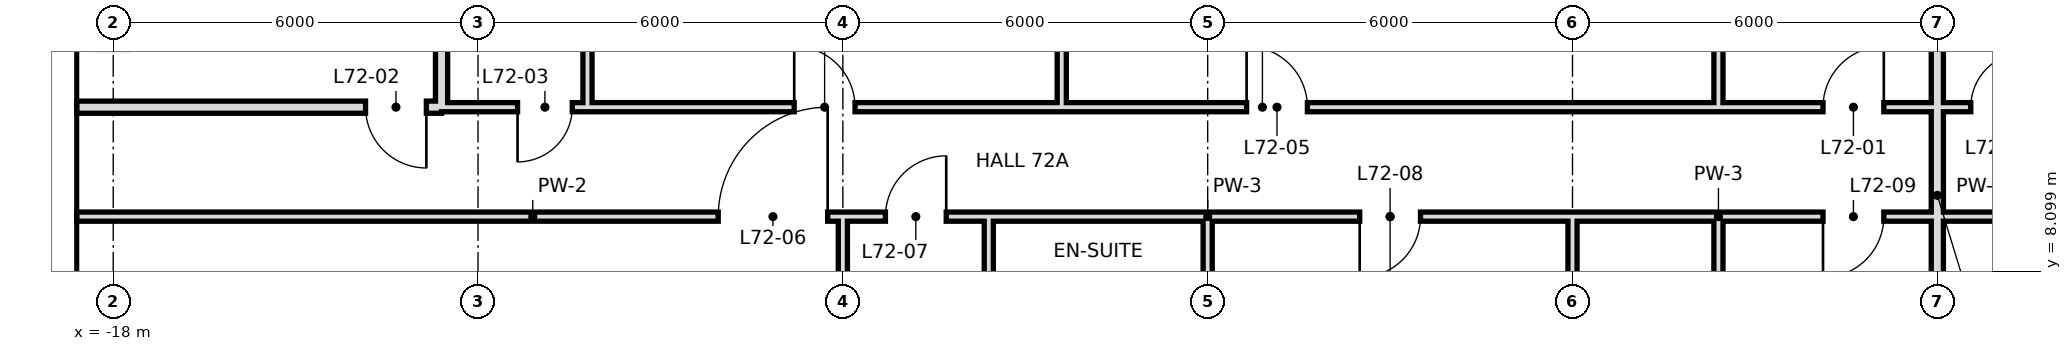
"""IFC4 building model, lengths in metres.
Left out: names, types, materials, properties, quantities, classifications, styles, units other than length and angle.
Written with IfcOpenShell. Run it as: python <this file> out.ifc"""

import sys

from ifc_helpers import new_model, si_unit, direction, frame, frame_2d, origin, place, context, subcontext, project, spatial, rectangle, extrude, element, fill, save


model = new_model("IFC4")
c1 = context("Model", 3, precision=1e-05, world=origin(), true_north=direction((0.0, 1.0)))
c2 = subcontext(c1, "Body", "Model", "MODEL_VIEW")
j1 = project(units=[si_unit("LENGTHUNIT", "METRE"), si_unit("PLANEANGLEUNIT", "RADIAN")], contexts=[c1])
p1 = place(None, origin())
s1 = spatial("IfcSite", under=j1, at=p1, CompositionType="ELEMENT")
p2 = place(p1, origin())
s2 = spatial("IfcBuilding", under=s1, at=p2, CompositionType="ELEMENT")
p3 = place(p2, frame((0.0, 0.0, 305.2)))
s3 = spatial("IfcBuildingStorey", under=s2, at=p3, CompositionType="ELEMENT", Elevation=305.2)
p4 = place(p3, frame((-10.2, 10.8, 0.0), z_axis=(0.0, 0.0, 1.0), x_axis=(0.0, 1.0, 0.0)))
e1 = element("IfcWall", 1, at=p4, inside=s3, PredefinedType="PARTITIONING", context=c2, shape_type="SweptSolid", body=[
    extrude(rectangle(XDim=7.2, YDim=0.15, at=frame_2d((3.6, 0.0))), origin(), (0.0, 0.0, 1.0), 3.42),
])
p5 = place(p3, frame((-12.6, 10.8, 0.0), z_axis=(0.0, 0.0, 1.0), x_axis=(0.0, 1.0, 0.0)))
e2 = element("IfcWall", 2, at=p5, inside=s3, PredefinedType="SOLIDWALL", context=c2, shape_type="SweptSolid", body=[
    extrude(rectangle(XDim=7.2, YDim=0.2, at=frame_2d((3.6, 0.0))), origin(), (0.0, 0.0, 1.0), 2.97),
])
p6 = place(p3, frame((-2.4, 10.8, 0.0), z_axis=(0.0, 0.0, 1.0), x_axis=(0.0, 1.0, 0.0)))
e3 = element("IfcWall", 3, at=p6, inside=s3, PredefinedType="PARTITIONING", context=c2, shape_type="SweptSolid", body=[
    extrude(rectangle(XDim=7.2, YDim=0.15, at=frame_2d((3.6, 0.0))), origin(), (0.0, 0.0, 1.0), 3.42),
])
p7 = place(p3, frame((-3.6, 6.0, 0.0), z_axis=(0.0, 0.0, 1.0), x_axis=(0.0, 1.0, 0.0)))
e4 = element("IfcWall", 4, at=p7, inside=s3, PredefinedType="PARTITIONING", context=c2, shape_type="SweptSolid", body=[
    extrude(rectangle(XDim=3.0, YDim=0.15, at=frame_2d((1.5, 0.0))), origin(), (0.0, 0.0, 1.0), 3.42),
])
p8 = place(p3, frame((-6.0, -0.6, 0.0), z_axis=(0.0, 0.0, 1.0), x_axis=(0.0, 1.0, 0.0)))
e5 = element("IfcWall", 5, at=p8, inside=s3, PredefinedType="PARTITIONING", context=c2, shape_type="SweptSolid", body=[
    extrude(rectangle(XDim=9.6, YDim=0.15, at=frame_2d((4.8, 0.0))), origin(), (0.0, 0.0, 1.0), 3.42),
])
p9 = place(p3, frame((0.0, 6.0, 0.0), z_axis=(0.0, 0.0, 1.0), x_axis=(0.0, 1.0, 0.0)))
e6 = element("IfcWall", 6, at=p9, inside=s3, PredefinedType="PARTITIONING", context=c2, shape_type="SweptSolid", body=[
    extrude(rectangle(XDim=3.0, YDim=0.15, at=frame_2d((1.5, 0.0))), origin(), (0.0, 0.0, 1.0), 2.72),
])
p10 = place(p3, frame((12.0, 0.0, 0.0), z_axis=(0.0, 0.0, 1.0), x_axis=(0.0, 1.0, 0.0)))
e7 = element("IfcWall", 7, at=p10, inside=s3, PredefinedType="SOLIDWALL", context=c2, shape_type="SweptSolid", body=[
    extrude(rectangle(XDim=18.7, YDim=0.2, at=frame_2d((9.35, 0.0))), origin(), (0.0, 0.0, 1.0), 2.72),
])
p11 = place(p3, frame((6.0, 6.0, 0.0), z_axis=(0.0, 0.0, 1.0), x_axis=(0.0, 1.0, 0.0)))
e8 = element("IfcWall", 8, at=p11, inside=s3, PredefinedType="PARTITIONING", context=c2, shape_type="SweptSolid", body=[
    extrude(rectangle(XDim=3.0, YDim=0.15, at=frame_2d((1.5, 0.0))), origin(), (0.0, 0.0, 1.0), 2.72),
])
p12 = place(p3, frame((8.4, 10.8, 0.0), z_axis=(0.0, 0.0, 1.0), x_axis=(0.0, 1.0, 0.0)))
e9 = element("IfcWall", 9, at=p12, inside=s3, PredefinedType="PARTITIONING", context=c2, shape_type="SweptSolid", body=[
    extrude(rectangle(XDim=7.9, YDim=0.15, at=frame_2d((3.95, 0.0))), origin(), (0.0, 0.0, 1.0), 3.42),
])
p13 = place(p3, frame((8.4, 6.0, 0.0), z_axis=(0.0, 0.0, 1.0), x_axis=(0.0, 1.0, 0.0)))
e10 = element("IfcWall", 10, at=p13, inside=s3, PredefinedType="PARTITIONING", context=c2, shape_type="SweptSolid", body=[
    extrude(rectangle(XDim=3.0, YDim=0.15, at=frame_2d((1.5, 0.0))), origin(), (0.0, 0.0, 1.0), 3.42),
])
p14 = place(p3, frame((-18.6, 10.8, 0.0), z_axis=(0.0, 0.0, 1.0), x_axis=(1.0, 0.0, 0.0)))
e11 = element("IfcWall", 11, at=p14, inside=s3, PredefinedType="SOLIDWALL", context=c2, shape_type="SweptSolid", body=[
    extrude(rectangle(XDim=6.0, YDim=0.2, at=frame_2d((3.0, 0.0))), origin(), (0.0, 0.0, 1.0), 2.97),
])
p15 = place(p14, frame((4.75, 0.0, 0.0)))
e12 = element("IfcOpeningElement", 12, at=p15, cuts=e11, PredefinedType="OPENING", context=c2, shape_type="SweptSolid", body=[
    extrude(rectangle(XDim=1.0, YDim=2.4, at=frame_2d((0.5, 1.2))), frame((0.0, 0.11, 0.0), z_axis=(0.0, -1.0, 0.0), x_axis=(1.0, 0.0, 0.0)), (0.0, 0.0, 1.0), 0.22),
])
p16 = place(p3, frame((-10.2, 10.8, 0.0), z_axis=(0.0, 0.0, 1.0), x_axis=(1.0, 0.0, 0.0)))
e13 = element("IfcWall", 13, at=p16, inside=s3, PredefinedType="PARTITIONING", context=c2, shape_type="SweptSolid", body=[
    extrude(rectangle(XDim=22.2, YDim=0.15, at=frame_2d((11.1, 0.0))), origin(), (0.0, 0.0, 1.0), 3.42),
])
p17 = place(p16, frame((20.32, 0.0, 0.0)))
e14 = element("IfcOpeningElement", 14, at=p17, cuts=e13, PredefinedType="OPENING", context=c2, shape_type="SweptSolid", body=[
    extrude(rectangle(XDim=1.0, YDim=2.4, at=frame_2d((0.5, 1.2))), frame((0.0, 0.085, 0.0), z_axis=(0.0, -1.0, 0.0), x_axis=(1.0, 0.0, 0.0)), (0.0, 0.0, 1.0), 0.17),
])
p18 = place(p16, frame((3.4, 0.0, 0.0)))
e15 = element("IfcOpeningElement", 15, at=p18, cuts=e13, PredefinedType="OPENING", context=c2, shape_type="SweptSolid", body=[
    extrude(rectangle(XDim=1.0, YDim=2.4, at=frame_2d((0.5, 1.2))), frame((0.0, 0.085, 0.0), z_axis=(0.0, -1.0, 0.0), x_axis=(1.0, 0.0, 0.0)), (0.0, 0.0, 1.0), 0.17),
])
p19 = place(p16, frame((10.84, 0.0, 0.0)))
e16 = element("IfcOpeningElement", 16, at=p19, cuts=e13, PredefinedType="OPENING", context=c2, shape_type="SweptSolid", body=[
    extrude(rectangle(XDim=1.0, YDim=2.4, at=frame_2d((0.5, 1.2))), frame((0.0, 0.085, 0.0), z_axis=(0.0, -1.0, 0.0), x_axis=(1.0, 0.0, 0.0)), (0.0, 0.0, 1.0), 0.17),
])
p20 = place(p3, frame((-12.6, 10.8, 0.0), z_axis=(0.0, 0.0, 1.0), x_axis=(1.0, 0.0, 0.0)))
e17 = element("IfcWall", 17, at=p20, inside=s3, PredefinedType="PARTITIONING", context=c2, shape_type="SweptSolid", body=[
    extrude(rectangle(XDim=2.4, YDim=0.15, at=frame_2d((1.2, 0.0))), origin(), (0.0, 0.0, 1.0), 3.42),
])
p21 = place(p20, frame((1.25, 0.0, 0.0)))
e18 = element("IfcOpeningElement", 18, at=p21, cuts=e17, PredefinedType="OPENING", context=c2, shape_type="SweptSolid", body=[
    extrude(rectangle(XDim=0.9, YDim=2.4, at=frame_2d((0.45, 1.2))), frame((0.0, 0.085, 0.0), z_axis=(0.0, -1.0, 0.0), x_axis=(1.0, 0.0, 0.0)), (0.0, 0.0, 1.0), 0.17),
])
p22 = place(p3, frame((12.0, 10.8, 0.0), z_axis=(0.0, 0.0, 1.0), x_axis=(1.0, 0.0, 0.0)))
e19 = element("IfcWall", 19, at=p22, inside=s3, PredefinedType="PARTITIONING", context=c2, shape_type="SweptSolid", body=[
    extrude(rectangle(XDim=2.4, YDim=0.15, at=frame_2d((1.2, 0.0))), origin(), (0.0, 0.0, 1.0), 3.42),
])
p23 = place(p22, frame((0.55, 0.0, 0.0)))
e20 = element("IfcOpeningElement", 20, at=p23, cuts=e19, PredefinedType="OPENING", context=c2, shape_type="SweptSolid", body=[
    extrude(rectangle(XDim=0.9, YDim=2.4, at=frame_2d((0.45, 1.2))), frame((0.0, 0.085, 0.0), z_axis=(0.0, -1.0, 0.0), x_axis=(1.0, 0.0, 0.0)), (0.0, 0.0, 1.0), 0.17),
])
p24 = place(p3, frame((-18.6, 9.0, 0.0), z_axis=(0.0, 0.0, 1.0), x_axis=(1.0, 0.0, 0.0)))
e21 = element("IfcWall", 21, at=p24, inside=s3, PredefinedType="PARTITIONING", context=c2, shape_type="SweptSolid", body=[
    extrude(rectangle(XDim=15.0, YDim=0.15, at=frame_2d((7.5, 0.0))), origin(), (0.0, 0.0, 1.0), 3.42),
])
p25 = place(p24, frame((10.55, 0.0, 0.0)))
e22 = element("IfcOpeningElement", 22, at=p25, cuts=e21, PredefinedType="OPENING", context=c2, shape_type="SweptSolid", body=[
    extrude(rectangle(XDim=1.8, YDim=2.4, at=frame_2d((0.9, 1.2))), frame((0.0, 0.085, 0.0), z_axis=(0.0, -1.0, 0.0), x_axis=(1.0, 0.0, 0.0)), (0.0, 0.0, 1.0), 0.17),
])
p26 = place(p24, frame((13.3, 0.0, 0.0)))
e23 = element("IfcOpeningElement", 23, at=p26, cuts=e21, PredefinedType="OPENING", context=c2, shape_type="SweptSolid", body=[
    extrude(rectangle(XDim=1.0, YDim=2.4, at=frame_2d((0.5, 1.2))), frame((0.0, 0.085, 0.0), z_axis=(0.0, -1.0, 0.0), x_axis=(1.0, 0.0, 0.0)), (0.0, 0.0, 1.0), 0.17),
])
p27 = place(p3, frame((0.0, 9.0, 0.0), z_axis=(0.0, 0.0, 1.0), x_axis=(1.0, 0.0, 0.0)))
e24 = element("IfcWall", 24, at=p27, inside=s3, PredefinedType="PARTITIONING", context=c2, shape_type="SweptSolid", body=[
    extrude(rectangle(XDim=6.0, YDim=0.15, at=frame_2d((3.0, 0.0))), origin(), (0.0, 0.0, 1.0), 3.42),
])
p28 = place(p27, frame((2.5, 0.0, 0.0)))
e25 = element("IfcOpeningElement", 25, at=p28, cuts=e24, PredefinedType="OPENING", context=c2, shape_type="SweptSolid", body=[
    extrude(rectangle(XDim=1.0, YDim=2.4, at=frame_2d((0.5, 1.2))), frame((0.0, 0.085, 0.0), z_axis=(0.0, -1.0, 0.0), x_axis=(1.0, 0.0, 0.0)), (0.0, 0.0, 1.0), 0.17),
])
p29 = place(p3, frame((8.4, 9.0, 0.0), z_axis=(0.0, 0.0, 1.0), x_axis=(1.0, 0.0, 0.0)))
e26 = element("IfcWall", 26, at=p29, inside=s3, PredefinedType="PARTITIONING", context=c2, shape_type="SweptSolid", body=[
    extrude(rectangle(XDim=9.6, YDim=0.15, at=frame_2d((4.8, 0.0))), origin(), (0.0, 0.0, 1.0), 3.42),
])
p30 = place(p29, frame((1.72, 0.0, 0.0)))
e27 = element("IfcOpeningElement", 27, at=p30, cuts=e26, PredefinedType="OPENING", context=c2, shape_type="SweptSolid", body=[
    extrude(rectangle(XDim=1.0, YDim=2.4, at=frame_2d((0.5, 1.2))), frame((0.0, 0.085, 0.0), z_axis=(0.0, -1.0, 0.0), x_axis=(1.0, 0.0, 0.0)), (0.0, 0.0, 1.0), 0.17),
])
p31 = place(p29, frame((5.2, 0.0, 0.0)))
e28 = element("IfcOpeningElement", 28, at=p31, cuts=e26, PredefinedType="OPENING", context=c2, shape_type="SweptSolid", body=[
    extrude(rectangle(XDim=1.0, YDim=2.4, at=frame_2d((0.5, 1.2))), frame((0.0, 0.085, 0.0), z_axis=(0.0, -1.0, 0.0), x_axis=(1.0, 0.0, 0.0)), (0.0, 0.0, 1.0), 0.17),
])
p32 = place(p3, frame((-3.6, 9.0, 0.0), z_axis=(0.0, 0.0, 1.0), x_axis=(1.0, 0.0, 0.0)))
e29 = element("IfcWall", 29, at=p32, inside=s3, PredefinedType="PARTITIONING", context=c2, shape_type="SweptSolid", body=[
    extrude(rectangle(XDim=3.6, YDim=0.15, at=frame_2d((1.8, 0.0))), origin(), (0.0, 0.0, 1.0), 3.42),
])
p33 = place(p3, frame((6.0, 9.0, 0.0), z_axis=(0.0, 0.0, 1.0), x_axis=(1.0, 0.0, 0.0)))
e30 = element("IfcWall", 30, at=p33, inside=s3, PredefinedType="PARTITIONING", context=c2, shape_type="SweptSolid", body=[
    extrude(rectangle(XDim=2.4, YDim=0.15, at=frame_2d((1.2, 0.0))), origin(), (0.0, 0.0, 1.0), 3.42),
])
p34 = place(p17, frame((1.0, 0.0, 0.0), z_axis=(0.0, 0.0, 1.0), x_axis=(-1.0, 0.0, 0.0)))
e31 = element("IfcDoor", 31, at=p34, inside=s3, OperationType="SINGLE_SWING_LEFT", PredefinedType="DOOR", context=c2, shape_type="SweptSolid", body=[
    extrude(rectangle(XDim=1.0, YDim=2.4, at=frame_2d((0.5, 1.2))), frame((0.0, 0.025, 0.0), z_axis=(0.0, -1.0, 0.0), x_axis=(1.0, 0.0, 0.0)), (0.0, 0.0, 1.0), 0.05),
])
fill(e14, e31)
p35 = place(p15, origin())
e32 = element("IfcDoor", 32, at=p35, inside=s3, OperationType="SINGLE_SWING_RIGHT", PredefinedType="DOOR", context=c2, shape_type="SweptSolid", body=[
    extrude(rectangle(XDim=1.0, YDim=2.4, at=frame_2d((0.5, 1.2))), frame((0.0, 0.025, 0.0), z_axis=(0.0, -1.0, 0.0), x_axis=(1.0, 0.0, 0.0)), (0.0, 0.0, 1.0), 0.05),
])
fill(e12, e32)
p36 = place(p21, frame((0.9, 0.0, 0.0), z_axis=(0.0, 0.0, 1.0), x_axis=(-1.0, 0.0, 0.0)))
e33 = element("IfcDoor", 33, at=p36, inside=s3, OperationType="SINGLE_SWING_RIGHT", PredefinedType="DOOR", context=c2, shape_type="SweptSolid", body=[
    extrude(rectangle(XDim=0.9, YDim=2.4, at=frame_2d((0.45, 1.2))), frame((0.0, 0.025, 0.0), z_axis=(0.0, -1.0, 0.0), x_axis=(1.0, 0.0, 0.0)), (0.0, 0.0, 1.0), 0.05),
])
fill(e18, e33)
p37 = place(p18, origin())
e34 = element("IfcDoor", 34, at=p37, inside=s3, OperationType="SINGLE_SWING_LEFT", PredefinedType="DOOR", context=c2, shape_type="SweptSolid", body=[
    extrude(rectangle(XDim=1.0, YDim=2.4, at=frame_2d((0.5, 1.2))), frame((0.0, 0.025, 0.0), z_axis=(0.0, -1.0, 0.0), x_axis=(1.0, 0.0, 0.0)), (0.0, 0.0, 1.0), 0.05),
])
fill(e15, e34)
p38 = place(p19, origin())
e35 = element("IfcDoor", 35, at=p38, inside=s3, OperationType="SINGLE_SWING_LEFT", PredefinedType="DOOR", context=c2, shape_type="SweptSolid", body=[
    extrude(rectangle(XDim=1.0, YDim=2.4, at=frame_2d((0.5, 1.2))), frame((0.0, 0.025, 0.0), z_axis=(0.0, -1.0, 0.0), x_axis=(1.0, 0.0, 0.0)), (0.0, 0.0, 1.0), 0.05),
])
fill(e16, e35)
p39 = place(p25, frame((1.8, 0.0, 0.0), z_axis=(0.0, 0.0, 1.0), x_axis=(-1.0, 0.0, 0.0)))
e36 = element("IfcDoor", 36, at=p39, inside=s3, OperationType="SINGLE_SWING_LEFT", PredefinedType="DOOR", context=c2, shape_type="SweptSolid", body=[
    extrude(rectangle(XDim=1.8, YDim=2.4, at=frame_2d((0.9, 1.2))), frame((0.0, 0.025, 0.0), z_axis=(0.0, -1.0, 0.0), x_axis=(1.0, 0.0, 0.0)), (0.0, 0.0, 1.0), 0.05),
])
fill(e22, e36)
p40 = place(p26, frame((1.0, 0.0, 0.0), z_axis=(0.0, 0.0, 1.0), x_axis=(-1.0, 0.0, 0.0)))
e37 = element("IfcDoor", 37, at=p40, inside=s3, OperationType="SINGLE_SWING_LEFT", PredefinedType="DOOR", context=c2, shape_type="SweptSolid", body=[
    extrude(rectangle(XDim=1.0, YDim=2.4, at=frame_2d((0.5, 1.2))), frame((0.0, 0.025, 0.0), z_axis=(0.0, -1.0, 0.0), x_axis=(1.0, 0.0, 0.0)), (0.0, 0.0, 1.0), 0.05),
])
fill(e23, e37)
p41 = place(p28, frame((1.0, 0.0, 0.0), z_axis=(0.0, 0.0, 1.0), x_axis=(-1.0, 0.0, 0.0)))
e38 = element("IfcDoor", 38, at=p41, inside=s3, OperationType="SINGLE_SWING_RIGHT", PredefinedType="DOOR", context=c2, shape_type="SweptSolid", body=[
    extrude(rectangle(XDim=1.0, YDim=2.4, at=frame_2d((0.5, 1.2))), frame((0.0, 0.025, 0.0), z_axis=(0.0, -1.0, 0.0), x_axis=(1.0, 0.0, 0.0)), (0.0, 0.0, 1.0), 0.05),
])
fill(e25, e38)
p42 = place(p30, frame((1.0, 0.0, 0.0), z_axis=(0.0, 0.0, 1.0), x_axis=(-1.0, 0.0, 0.0)))
e39 = element("IfcDoor", 39, at=p42, inside=s3, OperationType="SINGLE_SWING_RIGHT", PredefinedType="DOOR", context=c2, shape_type="SweptSolid", body=[
    extrude(rectangle(XDim=1.0, YDim=2.4, at=frame_2d((0.5, 1.2))), frame((0.0, 0.025, 0.0), z_axis=(0.0, -1.0, 0.0), x_axis=(1.0, 0.0, 0.0)), (0.0, 0.0, 1.0), 0.05),
])
fill(e27, e39)
p43 = place(p23, frame((0.9, 0.0, 0.0), z_axis=(0.0, 0.0, 1.0), x_axis=(-1.0, 0.0, 0.0)))
e40 = element("IfcDoor", 40, at=p43, inside=s3, OperationType="SINGLE_SWING_LEFT", PredefinedType="DOOR", context=c2, shape_type="SweptSolid", body=[
    extrude(rectangle(XDim=0.9, YDim=2.4, at=frame_2d((0.45, 1.2))), frame((0.0, 0.025, 0.0), z_axis=(0.0, -1.0, 0.0), x_axis=(1.0, 0.0, 0.0)), (0.0, 0.0, 1.0), 0.05),
])
fill(e20, e40)
save(model, sys.argv[1])
